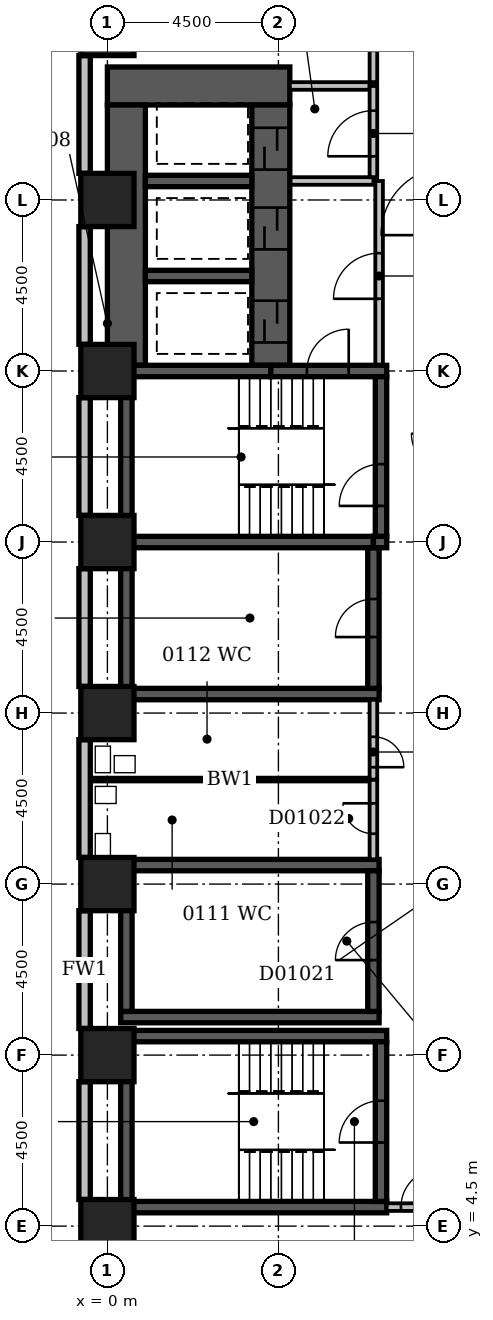
"""IFC4 building model, lengths in metres.
Left out: names, types, materials, properties, quantities, classifications, styles, units other than length and angle.
Written with IfcOpenShell. Run it as: python <this file> out.ifc"""

import sys

from ifc_helpers import new_model, si_unit, direction, frame, frame_2d, origin, origin_2d, place, context, subcontext, project, spatial, rectangle, extrude, element, fill, save


model = new_model("IFC4")
c1 = context("Model", 3, precision=1e-05, world=origin(), true_north=direction((0.0, 1.0)))
c2 = subcontext(c1, "Body", "Model", "MODEL_VIEW")
j1 = project(units=[si_unit("LENGTHUNIT", "METRE"), si_unit("PLANEANGLEUNIT", "RADIAN")], contexts=[c1])
p1 = place(None, origin())
s1 = spatial("IfcSite", under=j1, at=p1, CompositionType="ELEMENT")
p2 = place(p1, origin())
s2 = spatial("IfcBuilding", under=s1, at=p2, CompositionType="ELEMENT")
p3 = place(p2, frame((0.0, 0.0, 9.0)))
s3 = spatial("IfcBuildingStorey", under=s2, at=p3, CompositionType="ELEMENT", Elevation=9.0)
p4 = place(p3, frame((0.0, 34.5, -0.6), z_axis=(0.0, 0.0, 1.0), x_axis=(1.0, 0.0, 0.0)))
e1 = element("IfcWall", 1, at=p4, inside=s3, PredefinedType="SHEAR", context=c2, shape_type="SweptSolid", body=[
    extrude(rectangle(XDim=4.8, YDim=1.0, at=frame_2d((2.4, 0.0))), origin(), (0.0, 0.0, 1.0), 5.2),
])
for number, where, z_axis, x_axis in (
    (2, (0.35, 5.0, -0.6), (0.0, 0.0, 1.0), (1.0, 0.0, 0.0)),
    (3, (0.35, 9.5, -0.6), (0.0, 0.0, 1.0), (1.0, 0.0, 0.0)),
):
    element("IfcWall", number, at=place(p3, frame(where, z_axis=z_axis, x_axis=x_axis)), inside=s3, PredefinedType="SHEAR", context=c2, shape_type="SweptSolid", body=[
        extrude(rectangle(XDim=7.0, YDim=0.3, at=frame_2d((3.5, 0.0))), origin(), (0.0, 0.0, 1.0), 5.2),
    ])
for number, where, z_axis, x_axis in (
    (4, (0.35, 10.0, -0.6), (0.0, 0.0, 1.0), (1.0, 0.0, 0.0)),
    (5, (0.35, 14.0, -0.6), (0.0, 0.0, 1.0), (1.0, 0.0, 0.0)),
    (6, (0.35, 18.5, -0.6), (0.0, 0.0, 1.0), (1.0, 0.0, 0.0)),
):
    element("IfcWall", number, at=place(p3, frame(where, z_axis=z_axis, x_axis=x_axis)), inside=s3, PredefinedType="SHEAR", context=c2, shape_type="SweptSolid", body=[
        extrude(rectangle(XDim=6.8, YDim=0.3, at=frame_2d((3.4, 0.0))), origin(), (0.0, 0.0, 1.0), 5.2),
    ])
p5 = place(p3, frame((0.35, 22.5, -0.6), z_axis=(0.0, 0.0, 1.0), x_axis=(1.0, 0.0, 0.0)))
e7 = element("IfcWall", 7, at=p5, inside=s3, PredefinedType="SHEAR", context=c2, shape_type="SweptSolid", body=[
    extrude(rectangle(XDim=6.65, YDim=0.3, at=frame_2d((3.325, 0.0))), origin(), (0.0, 0.0, 1.0), 5.2),
])
p6 = place(p3, frame((0.35, 27.0, -0.6), z_axis=(0.0, 0.0, 1.0), x_axis=(1.0, 0.0, 0.0)))
e8 = element("IfcWall", 8, at=p6, inside=s3, PredefinedType="SHEAR", context=c2, shape_type="SweptSolid", body=[
    extrude(rectangle(XDim=3.95, YDim=0.3, at=frame_2d((1.975, 0.0))), origin(), (0.0, 0.0, 1.0), 5.2),
])
p7 = place(p3, frame((0.5, 5.15, -0.6), z_axis=(0.0, 0.0, 1.0), x_axis=(0.0, 1.0, 0.0)))
e9 = element("IfcWall", 9, at=p7, inside=s3, PredefinedType="SHEAR", context=c2, shape_type="SweptSolid", body=[
    extrude(rectangle(XDim=4.2, YDim=0.3, at=frame_2d((2.1, 0.0))), origin(), (0.0, 0.0, 1.0), 5.2),
])
for number, where, z_axis, x_axis in (
    (10, (0.5, 10.15, -0.6), (0.0, 0.0, 1.0), (0.0, 1.0, 0.0)),
    (11, (0.5, 18.65, -0.6), (0.0, 0.0, 1.0), (0.0, 1.0, 0.0)),
):
    element("IfcWall", number, at=place(p3, frame(where, z_axis=z_axis, x_axis=x_axis)), inside=s3, PredefinedType="SHEAR", context=c2, shape_type="SweptSolid", body=[
        extrude(rectangle(XDim=3.7, YDim=0.3, at=frame_2d((1.85, 0.0))), origin(), (0.0, 0.0, 1.0), 5.2),
    ])
p8 = place(p3, frame((0.5, 22.65, -0.6), z_axis=(0.0, 0.0, 1.0), x_axis=(0.0, 1.0, 0.0)))
e12 = element("IfcWall", 12, at=p8, inside=s3, PredefinedType="SHEAR", context=c2, shape_type="SweptSolid", body=[
    extrude(rectangle(XDim=4.2, YDim=0.3, at=frame_2d((2.1, 0.0))), origin(), (0.0, 0.0, 1.0), 5.2),
])
p9 = place(p3, frame((0.5, 27.15, -0.6), z_axis=(0.0, 0.0, 1.0), x_axis=(0.0, 1.0, 0.0)))
e13 = element("IfcWall", 13, at=p9, inside=s3, PredefinedType="SHEAR", context=c2, shape_type="SweptSolid", body=[
    extrude(rectangle(XDim=6.85, YDim=1.0, at=frame_2d((3.425, 0.0))), origin(), (0.0, 0.0, 1.0), 5.2),
])
for number, where, z_axis, x_axis in (
    (14, (1.0, 29.5, -0.6), (0.0, 0.0, 1.0), (1.0, 0.0, 0.0)),
    (15, (1.0, 32.0, -0.6), (0.0, 0.0, 1.0), (1.0, 0.0, 0.0)),
):
    element("IfcWall", number, at=place(p3, frame(where, z_axis=z_axis, x_axis=x_axis)), inside=s3, PredefinedType="SHEAR", context=c2, shape_type="SweptSolid", body=[
        extrude(rectangle(XDim=2.8, YDim=0.3, at=frame_2d((1.4, 0.0))), origin(), (0.0, 0.0, 1.0), 5.2),
    ])
p10 = place(p3, frame((4.3, 27.0, -0.6), z_axis=(0.0, 0.0, 1.0), x_axis=(1.0, 0.0, 0.0)))
e16 = element("IfcWall", 16, at=p10, inside=s3, PredefinedType="SHEAR", context=c2, shape_type="SweptSolid", body=[
    extrude(rectangle(XDim=3.05, YDim=0.3, at=frame_2d((1.525, 0.0))), origin(), (0.0, 0.0, 1.0), 5.2),
])
p11 = place(p10, frame((0.95, 0.0, 0.6)))
e17 = element("IfcOpeningElement", 17, at=p11, cuts=e16, PredefinedType="OPENING", context=c2, shape_type="SweptSolid", body=[
    extrude(rectangle(XDim=1.1, YDim=2.1, at=frame_2d((0.55, 1.05))), frame((0.0, 0.162, 0.0), z_axis=(0.0, -1.0, 0.0), x_axis=(1.0, 0.0, 0.0)), (0.0, 0.0, 1.0), 0.324),
])
p12 = place(p3, frame((4.3, 27.15, -0.6), z_axis=(0.0, 0.0, 1.0), x_axis=(0.0, 1.0, 0.0)))
e18 = element("IfcWall", 18, at=p12, inside=s3, PredefinedType="SHEAR", context=c2, shape_type="SweptSolid", body=[
    extrude(rectangle(XDim=6.85, YDim=1.0, at=frame_2d((3.425, 0.0))), origin(), (0.0, 0.0, 1.0), 5.2),
])
p13 = place(p12, frame((3.05, 0.0, 0.6)))
e19 = element("IfcOpeningElement", 19, at=p13, cuts=e18, PredefinedType="OPENING", context=c2, shape_type="SweptSolid", body=[
    extrude(rectangle(XDim=1.1, YDim=2.1, at=frame_2d((0.55, 1.05))), frame((0.0, 0.512, 0.0), z_axis=(0.0, -1.0, 0.0), x_axis=(1.0, 0.0, 0.0)), (0.0, 0.0, 1.0), 1.024),
])
p14 = place(p12, frame((0.6, 0.0, 0.6)))
e20 = element("IfcOpeningElement", 20, at=p14, cuts=e18, PredefinedType="OPENING", context=c2, shape_type="SweptSolid", body=[
    extrude(rectangle(XDim=1.1, YDim=2.1, at=frame_2d((0.55, 1.05))), frame((0.0, 0.512, 0.0), z_axis=(0.0, -1.0, 0.0), x_axis=(1.0, 0.0, 0.0)), (0.0, 0.0, 1.0), 1.024),
])
p15 = place(p12, frame((5.15, 0.0, 0.6)))
e21 = element("IfcOpeningElement", 21, at=p15, cuts=e18, PredefinedType="OPENING", context=c2, shape_type="SweptSolid", body=[
    extrude(rectangle(XDim=1.1, YDim=2.1, at=frame_2d((0.55, 1.05))), frame((0.0, 0.512, 0.0), z_axis=(0.0, -1.0, 0.0), x_axis=(1.0, 0.0, 0.0)), (0.0, 0.0, 1.0), 1.024),
])
p16 = place(p3, frame((7.0, 10.15, -0.6), z_axis=(0.0, 0.0, 1.0), x_axis=(0.0, 1.0, 0.0)))
e22 = element("IfcWall", 22, at=p16, inside=s3, PredefinedType="SHEAR", context=c2, shape_type="SweptSolid", body=[
    extrude(rectangle(XDim=3.7, YDim=0.3, at=frame_2d((1.85, 0.0))), origin(), (0.0, 0.0, 1.0), 5.2),
])
p17 = place(p16, frame((1.35, 0.0, 0.6)))
e23 = element("IfcOpeningElement", 23, at=p17, cuts=e22, PredefinedType="OPENING", context=c2, shape_type="SweptSolid", body=[
    extrude(rectangle(XDim=1.0, YDim=2.1, at=frame_2d((0.5, 1.05))), frame((0.0, 0.162, 0.0), z_axis=(0.0, -1.0, 0.0), x_axis=(1.0, 0.0, 0.0)), (0.0, 0.0, 1.0), 0.324),
])
p18 = place(p3, frame((7.0, 18.65, -0.6), z_axis=(0.0, 0.0, 1.0), x_axis=(0.0, 1.0, 0.0)))
e24 = element("IfcWall", 24, at=p18, inside=s3, PredefinedType="SHEAR", context=c2, shape_type="SweptSolid", body=[
    extrude(rectangle(XDim=3.7, YDim=0.3, at=frame_2d((1.85, 0.0))), origin(), (0.0, 0.0, 1.0), 5.2),
])
p19 = place(p18, frame((1.35, 0.0, 0.6)))
e25 = element("IfcOpeningElement", 25, at=p19, cuts=e24, PredefinedType="OPENING", context=c2, shape_type="SweptSolid", body=[
    extrude(rectangle(XDim=1.0, YDim=2.1, at=frame_2d((0.5, 1.05))), frame((0.0, 0.162, 0.0), z_axis=(0.0, -1.0, 0.0), x_axis=(1.0, 0.0, 0.0)), (0.0, 0.0, 1.0), 0.324),
])
p20 = place(p3, frame((7.0, 22.5, -0.6), z_axis=(0.0, 0.0, 1.0), x_axis=(1.0, 0.0, 0.0)))
e26 = element("IfcWall", 26, at=p20, inside=s3, PredefinedType="SHEAR", context=c2, shape_type="SweptSolid", body=[
    extrude(rectangle(XDim=0.35, YDim=0.3, at=frame_2d((0.175, 0.0))), origin(), (0.0, 0.0, 1.0), 5.2),
])
p21 = place(p3, frame((7.2, 5.15, -0.6), z_axis=(0.0, 0.0, 1.0), x_axis=(0.0, 1.0, 0.0)))
e27 = element("IfcWall", 27, at=p21, inside=s3, PredefinedType="SHEAR", context=c2, shape_type="SweptSolid", body=[
    extrude(rectangle(XDim=4.2, YDim=0.3, at=frame_2d((2.1, 0.0))), origin(), (0.0, 0.0, 1.0), 5.2),
])
p22 = place(p21, frame((1.55, 0.0, 0.6)))
e28 = element("IfcOpeningElement", 28, at=p22, cuts=e27, PredefinedType="OPENING", context=c2, shape_type="SweptSolid", body=[
    extrude(rectangle(XDim=1.1, YDim=2.1, at=frame_2d((0.55, 1.05))), frame((0.0, 0.162, 0.0), z_axis=(0.0, -1.0, 0.0), x_axis=(1.0, 0.0, 0.0)), (0.0, 0.0, 1.0), 0.324),
])
p23 = place(p3, frame((7.2, 22.65, -0.6), z_axis=(0.0, 0.0, 1.0), x_axis=(0.0, 1.0, 0.0)))
e29 = element("IfcWall", 29, at=p23, inside=s3, PredefinedType="SHEAR", context=c2, shape_type="SweptSolid", body=[
    extrude(rectangle(XDim=4.2, YDim=0.3, at=frame_2d((2.1, 0.0))), origin(), (0.0, 0.0, 1.0), 5.2),
])
p24 = place(p23, frame((0.8, 0.0, 0.6)))
e30 = element("IfcOpeningElement", 30, at=p24, cuts=e29, PredefinedType="OPENING", context=c2, shape_type="SweptSolid", body=[
    extrude(rectangle(XDim=1.1, YDim=2.1, at=frame_2d((0.55, 1.05))), frame((0.0, 0.162, 0.0), z_axis=(0.0, -1.0, 0.0), x_axis=(1.0, 0.0, 0.0)), (0.0, 0.0, 1.0), 0.324),
])
for number, where, z_axis, x_axis in (
    (31, (0.0, 4.5, -0.6), (0.0, 0.0, 1.0), (1.0, 0.0, 0.0)),
    (32, (0.0, 9.0, -0.6), (0.0, 0.0, 1.0), (1.0, 0.0, 0.0)),
    (33, (0.0, 13.5, -0.6), (0.0, 0.0, 1.0), (1.0, 0.0, 0.0)),
    (34, (0.0, 18.0, -0.6), (0.0, 0.0, 1.0), (1.0, 0.0, 0.0)),
    (35, (0.0, 22.5, -0.6), (0.0, 0.0, 1.0), (1.0, 0.0, 0.0)),
    (36, (0.0, 27.0, -0.6), (0.0, 0.0, 1.0), (1.0, 0.0, 0.0)),
    (37, (0.0, 31.5, -0.6), (0.0, 0.0, 1.0), (1.0, 0.0, 0.0)),
    (38, (0.0, 36.0, -0.6), (0.0, 0.0, 1.0), (1.0, 0.0, 0.0)),
):
    element("IfcColumn", number, at=place(p3, frame(where, z_axis=z_axis, x_axis=x_axis)), inside=s3, PredefinedType="COLUMN", context=c2, shape_type="SweptSolid", body=[
        extrude(rectangle(XDim=1.4, YDim=1.4, at=origin_2d()), origin(), (0.0, 0.0, 1.0), 5.2),
    ])
for number, where, z_axis, x_axis in (
    (39, (-0.6, 35.3, 0.0), (0.0, 0.0, 1.0), (0.0, -1.0, 0.0)),
    (40, (-0.6, 30.8, 0.0), (0.0, 0.0, 1.0), (0.0, -1.0, 0.0)),
    (41, (-0.6, 26.3, 0.0), (0.0, 0.0, 1.0), (0.0, -1.0, 0.0)),
    (42, (-0.6, 21.8, 0.0), (0.0, 0.0, 1.0), (0.0, -1.0, 0.0)),
    (43, (-0.6, 17.3, 0.0), (0.0, 0.0, 1.0), (0.0, -1.0, 0.0)),
    (44, (-0.6, 12.8, 0.0), (0.0, 0.0, 1.0), (0.0, -1.0, 0.0)),
    (45, (-0.6, 8.3, 0.0), (0.0, 0.0, 1.0), (0.0, -1.0, 0.0)),
):
    element("IfcWall", number, at=place(p3, frame(where, z_axis=z_axis, x_axis=x_axis)), inside=s3, PredefinedType="STANDARD", context=c2, shape_type="SweptSolid", body=[
        extrude(rectangle(XDim=3.1, YDim=0.3, at=frame_2d((1.55, 0.0))), origin(), (0.0, 0.0, 1.0), 3.9),
    ])
p25 = place(p3, frame((4.82, 32.0, 0.0), z_axis=(0.0, 0.0, 1.0), x_axis=(1.0, 0.0, 0.0)))
e46 = element("IfcWall", 46, at=p25, inside=s3, PredefinedType="PARTITIONING", context=c2, shape_type="SweptSolid", body=[
    extrude(rectangle(XDim=2.18, YDim=0.2, at=frame_2d((1.09, 0.0))), origin(), (0.0, 0.0, 1.0), 4.6),
])
p26 = place(p3, frame((7.0, 32.1, 0.0), z_axis=(0.0, 0.0, 1.0), x_axis=(0.0, 1.0, 0.0)))
e47 = element("IfcWall", 47, at=p26, inside=s3, PredefinedType="PARTITIONING", context=c2, shape_type="SweptSolid", body=[
    extrude(rectangle(XDim=2.4, YDim=0.2, at=frame_2d((1.2, 0.0))), origin(), (0.0, 0.0, 1.0), 4.6),
])
p27 = place(p26, frame((0.55, 0.0, 0.0)))
e48 = element("IfcOpeningElement", 48, at=p27, cuts=e47, PredefinedType="OPENING", context=c2, shape_type="SweptSolid", body=[
    extrude(rectangle(XDim=1.2, YDim=2.1, at=frame_2d((0.6, 1.05))), frame((0.0, 0.112, 0.0), z_axis=(0.0, -1.0, 0.0), x_axis=(1.0, 0.0, 0.0)), (0.0, 0.0, 1.0), 0.224),
])
p28 = place(p3, frame((4.8, 34.5, 0.0), z_axis=(0.0, 0.0, 1.0), x_axis=(1.0, 0.0, 0.0)))
e49 = element("IfcWall", 49, at=p28, inside=s3, PredefinedType="PARTITIONING", context=c2, shape_type="SweptSolid", body=[
    extrude(rectangle(XDim=2.1, YDim=0.2, at=frame_2d((1.05, 0.0))), origin(), (0.0, 0.0, 1.0), 4.6),
])
p29 = place(p3, frame((7.15, 27.17, 0.0), z_axis=(0.0, 0.0, 1.0), x_axis=(0.0, 1.0, 0.0)))
e50 = element("IfcWall", 50, at=p29, inside=s3, PredefinedType="PARTITIONING", context=c2, shape_type="SweptSolid", body=[
    extrude(rectangle(XDim=4.83, YDim=0.2, at=frame_2d((2.415, 0.0))), origin(), (0.0, 0.0, 1.0), 4.6),
])
p30 = place(p29, frame((1.73, 0.0, 0.0)))
e51 = element("IfcOpeningElement", 51, at=p30, cuts=e50, PredefinedType="OPENING", context=c2, shape_type="SweptSolid", body=[
    extrude(rectangle(XDim=1.2, YDim=2.1, at=frame_2d((0.6, 1.05))), frame((0.0, 0.112, 0.0), z_axis=(0.0, -1.0, 0.0), x_axis=(1.0, 0.0, 0.0)), (0.0, 0.0, 1.0), 0.224),
])
p31 = place(p3, frame((7.35, 5.0, 0.0), z_axis=(0.0, 0.0, 1.0), x_axis=(1.0, 0.0, 0.0)))
e52 = element("IfcWall", 52, at=p31, inside=s3, PredefinedType="PARTITIONING", context=c2, shape_type="SweptSolid", body=[
    extrude(rectangle(XDim=1.75, YDim=0.2, at=frame_2d((0.875, 0.0))), origin(), (0.0, 0.0, 1.0), 4.6),
])
p32 = place(p31, frame((0.375, 0.0, 0.0)))
e53 = element("IfcOpeningElement", 53, at=p32, cuts=e52, PredefinedType="OPENING", context=c2, shape_type="SweptSolid", body=[
    extrude(rectangle(XDim=1.0, YDim=2.1, at=frame_2d((0.5, 1.05))), frame((0.0, 0.112, 0.0), z_axis=(0.0, -1.0, 0.0), x_axis=(1.0, 0.0, 0.0)), (0.0, 0.0, 1.0), 0.224),
])
p33 = place(p3, frame((-0.45, 16.25, 0.0), z_axis=(0.0, 0.0, 1.0), x_axis=(1.0, 0.0, 0.0)))
e54 = element("IfcWall", 54, at=p33, inside=s3, PredefinedType="PLUMBINGWALL", context=c2, shape_type="SweptSolid", body=[
    extrude(rectangle(XDim=7.35, YDim=0.1, at=frame_2d((3.675, 0.0))), origin(), (0.0, 0.0, 1.0), 4.6),
])
p34 = place(p3, frame((7.0, 16.25, 0.0), z_axis=(0.0, 0.0, 1.0), x_axis=(0.0, -1.0, 0.0)))
e55 = element("IfcWall", 55, at=p34, inside=s3, PredefinedType="PARTITIONING", context=c2, shape_type="SweptSolid", body=[
    extrude(rectangle(XDim=2.1, YDim=0.2, at=frame_2d((1.05, 0.0))), origin(), (0.0, 0.0, 1.0), 4.6),
])
p35 = place(p34, frame((0.625, 0.0, 0.0)))
e56 = element("IfcOpeningElement", 56, at=p35, cuts=e55, PredefinedType="OPENING", context=c2, shape_type="SweptSolid", body=[
    extrude(rectangle(XDim=0.8, YDim=2.1, at=frame_2d((0.4, 1.05))), frame((0.0, 0.112, 0.0), z_axis=(0.0, -1.0, 0.0), x_axis=(1.0, 0.0, 0.0)), (0.0, 0.0, 1.0), 0.224),
])
p36 = place(p3, frame((7.0, 18.35, 0.0), z_axis=(0.0, 0.0, 1.0), x_axis=(0.0, -1.0, 0.0)))
e57 = element("IfcWall", 57, at=p36, inside=s3, PredefinedType="PARTITIONING", context=c2, shape_type="SweptSolid", body=[
    extrude(rectangle(XDim=2.1, YDim=0.2, at=frame_2d((1.05, 0.0))), origin(), (0.0, 0.0, 1.0), 4.6),
])
p37 = place(p36, frame((0.975, 0.0, 0.0)))
e58 = element("IfcOpeningElement", 58, at=p37, cuts=e57, PredefinedType="OPENING", context=c2, shape_type="SweptSolid", body=[
    extrude(rectangle(XDim=0.8, YDim=2.1, at=frame_2d((0.4, 1.05))), frame((0.0, 0.112, 0.0), z_axis=(0.0, -1.0, 0.0), x_axis=(1.0, 0.0, 0.0)), (0.0, 0.0, 1.0), 0.224),
])
p38 = place(p3, frame((7.0, 37.0, 0.0), z_axis=(0.0, 0.0, 1.0), x_axis=(0.0, -1.0, 0.0)))
e59 = element("IfcWall", 59, at=p38, inside=s3, PredefinedType="PARTITIONING", context=c2, shape_type="SweptSolid", body=[
    extrude(rectangle(XDim=2.4, YDim=0.2, at=frame_2d((1.2, 0.0))), origin(), (0.0, 0.0, 1.0), 4.6),
])
p39 = place(p38, frame((0.775, 0.0, 0.0)))
e60 = element("IfcOpeningElement", 60, at=p39, cuts=e59, PredefinedType="OPENING", context=c2, shape_type="SweptSolid", body=[
    extrude(rectangle(XDim=0.8, YDim=2.1, at=frame_2d((0.4, 1.05))), frame((0.0, 0.112, 0.0), z_axis=(0.0, -1.0, 0.0), x_axis=(1.0, 0.0, 0.0)), (0.0, 0.0, 1.0), 0.224),
])
p40 = place(p30, origin())
e61 = element("IfcDoor", 61, at=p40, inside=s3, OperationType="SINGLE_SWING_LEFT", PredefinedType="DOOR", context=c2, shape_type="SweptSolid", body=[
    extrude(rectangle(XDim=1.2, YDim=2.1, at=frame_2d((0.6, 1.05))), frame((0.0, 0.025, 0.0), z_axis=(0.0, -1.0, 0.0), x_axis=(1.0, 0.0, 0.0)), (0.0, 0.0, 1.0), 0.05),
])
fill(e51, e61)
p41 = place(p13, origin())
e62 = element("IfcDoor", 62, at=p41, inside=s3, OperationType="SLIDING_TO_LEFT", PredefinedType="DOOR", context=c2, shape_type="SweptSolid", body=[
    extrude(rectangle(XDim=1.1, YDim=2.1, at=frame_2d((0.55, 1.05))), frame((0.0, 0.025, 0.0), z_axis=(0.0, -1.0, 0.0), x_axis=(1.0, 0.0, 0.0)), (0.0, 0.0, 1.0), 0.05),
])
fill(e19, e62)
p42 = place(p14, origin())
e63 = element("IfcDoor", 63, at=p42, inside=s3, OperationType="SLIDING_TO_LEFT", PredefinedType="DOOR", context=c2, shape_type="SweptSolid", body=[
    extrude(rectangle(XDim=1.1, YDim=2.1, at=frame_2d((0.55, 1.05))), frame((0.0, 0.025, 0.0), z_axis=(0.0, -1.0, 0.0), x_axis=(1.0, 0.0, 0.0)), (0.0, 0.0, 1.0), 0.05),
])
fill(e20, e63)
p43 = place(p27, origin())
e64 = element("IfcDoor", 64, at=p43, inside=s3, OperationType="SINGLE_SWING_LEFT", PredefinedType="DOOR", context=c2, shape_type="SweptSolid", body=[
    extrude(rectangle(XDim=1.2, YDim=2.1, at=frame_2d((0.6, 1.05))), frame((0.0, 0.025, 0.0), z_axis=(0.0, -1.0, 0.0), x_axis=(1.0, 0.0, 0.0)), (0.0, 0.0, 1.0), 0.05),
])
fill(e48, e64)
p44 = place(p15, origin())
e65 = element("IfcDoor", 65, at=p44, inside=s3, OperationType="SLIDING_TO_LEFT", PredefinedType="DOOR", context=c2, shape_type="SweptSolid", body=[
    extrude(rectangle(XDim=1.1, YDim=2.1, at=frame_2d((0.55, 1.05))), frame((0.0, 0.025, 0.0), z_axis=(0.0, -1.0, 0.0), x_axis=(1.0, 0.0, 0.0)), (0.0, 0.0, 1.0), 0.05),
])
fill(e21, e65)
p45 = place(p19, origin())
e66 = element("IfcDoor", 66, at=p45, inside=s3, OperationType="SINGLE_SWING_LEFT", PredefinedType="DOOR", context=c2, shape_type="SweptSolid", body=[
    extrude(rectangle(XDim=1.0, YDim=2.1, at=frame_2d((0.5, 1.05))), frame((0.0, 0.025, 0.0), z_axis=(0.0, -1.0, 0.0), x_axis=(1.0, 0.0, 0.0)), (0.0, 0.0, 1.0), 0.05),
])
fill(e25, e66)
p46 = place(p17, origin())
e67 = element("IfcDoor", 67, at=p46, inside=s3, OperationType="SINGLE_SWING_LEFT", PredefinedType="DOOR", context=c2, shape_type="SweptSolid", body=[
    extrude(rectangle(XDim=1.0, YDim=2.1, at=frame_2d((0.5, 1.05))), frame((0.0, 0.025, 0.0), z_axis=(0.0, -1.0, 0.0), x_axis=(1.0, 0.0, 0.0)), (0.0, 0.0, 1.0), 0.05),
])
fill(e23, e67)
p47 = place(p11, frame((1.1, 0.0, 0.0), z_axis=(0.0, 0.0, 1.0), x_axis=(-1.0, 0.0, 0.0)))
e68 = element("IfcDoor", 68, at=p47, inside=s3, OperationType="SINGLE_SWING_LEFT", PredefinedType="DOOR", context=c2, shape_type="SweptSolid", body=[
    extrude(rectangle(XDim=1.1, YDim=2.1, at=frame_2d((0.55, 1.05))), frame((0.0, 0.025, 0.0), z_axis=(0.0, -1.0, 0.0), x_axis=(1.0, 0.0, 0.0)), (0.0, 0.0, 1.0), 0.05),
])
fill(e17, e68)
p48 = place(p24, origin())
e69 = element("IfcDoor", 69, at=p48, inside=s3, OperationType="SINGLE_SWING_LEFT", PredefinedType="DOOR", context=c2, shape_type="SweptSolid", body=[
    extrude(rectangle(XDim=1.1, YDim=2.1, at=frame_2d((0.55, 1.05))), frame((0.0, 0.025, 0.0), z_axis=(0.0, -1.0, 0.0), x_axis=(1.0, 0.0, 0.0)), (0.0, 0.0, 1.0), 0.05),
])
fill(e30, e69)
p49 = place(p22, origin())
e70 = element("IfcDoor", 70, at=p49, inside=s3, OperationType="SINGLE_SWING_LEFT", PredefinedType="DOOR", context=c2, shape_type="SweptSolid", body=[
    extrude(rectangle(XDim=1.1, YDim=2.1, at=frame_2d((0.55, 1.05))), frame((0.0, 0.025, 0.0), z_axis=(0.0, -1.0, 0.0), x_axis=(1.0, 0.0, 0.0)), (0.0, 0.0, 1.0), 0.05),
])
fill(e28, e70)
p50 = place(p32, frame((1.0, 0.0, 0.0), z_axis=(0.0, 0.0, 1.0), x_axis=(-1.0, 0.0, 0.0)))
e71 = element("IfcDoor", 71, at=p50, inside=s3, OperationType="SINGLE_SWING_LEFT", PredefinedType="DOOR", context=c2, shape_type="SweptSolid", body=[
    extrude(rectangle(XDim=1.0, YDim=2.1, at=frame_2d((0.5, 1.05))), frame((0.0, 0.025, 0.0), z_axis=(0.0, -1.0, 0.0), x_axis=(1.0, 0.0, 0.0)), (0.0, 0.0, 1.0), 0.05),
])
fill(e53, e71)
p51 = place(p35, frame((0.8, 0.0, 0.0), z_axis=(0.0, 0.0, 1.0), x_axis=(-1.0, 0.0, 0.0)))
e72 = element("IfcDoor", 72, at=p51, inside=s3, OperationType="SINGLE_SWING_RIGHT", PredefinedType="DOOR", context=c2, shape_type="SweptSolid", body=[
    extrude(rectangle(XDim=0.8, YDim=2.1, at=frame_2d((0.4, 1.05))), frame((0.0, 0.025, 0.0), z_axis=(0.0, -1.0, 0.0), x_axis=(1.0, 0.0, 0.0)), (0.0, 0.0, 1.0), 0.05),
])
fill(e56, e72)
p52 = place(p37, frame((0.8, 0.0, 0.0), z_axis=(0.0, 0.0, 1.0), x_axis=(-1.0, 0.0, 0.0)))
e73 = element("IfcDoor", 73, at=p52, inside=s3, OperationType="SINGLE_SWING_LEFT", PredefinedType="DOOR", context=c2, shape_type="SweptSolid", body=[
    extrude(rectangle(XDim=0.8, YDim=2.1, at=frame_2d((0.4, 1.05))), frame((0.0, 0.025, 0.0), z_axis=(0.0, -1.0, 0.0), x_axis=(1.0, 0.0, 0.0)), (0.0, 0.0, 1.0), 0.05),
])
fill(e58, e73)
save(model, sys.argv[1])
